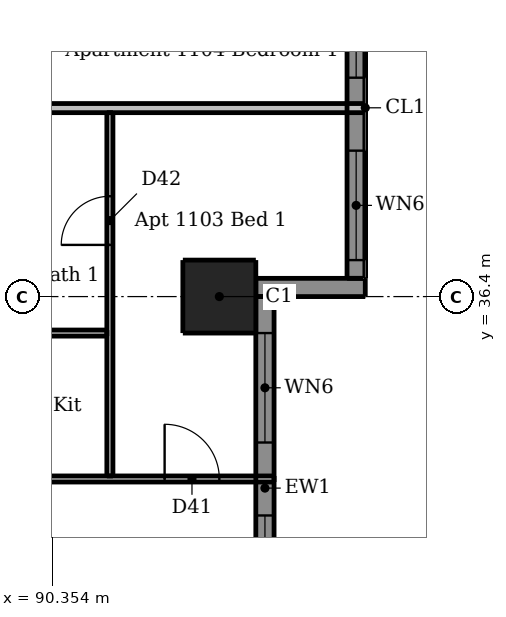
"""IFC4 building model, lengths in metres.
Left out: names, types, materials, properties, quantities, classifications, styles, units other than length and angle.
Written with IfcOpenShell. Run it as: python <this file> out.ifc"""

import sys

from ifc_helpers import new_model, si_unit, direction, frame, frame_2d, origin, origin_2d, place, context, subcontext, project, spatial, rectangle, extrude, element, fill, save


model = new_model("IFC4")
c1 = context("Model", 3, precision=1e-05, world=origin(), true_north=direction((0.0, 1.0)))
c2 = subcontext(c1, "Body", "Model", "MODEL_VIEW")
j1 = project(units=[si_unit("LENGTHUNIT", "METRE"), si_unit("PLANEANGLEUNIT", "RADIAN")], contexts=[c1])
p1 = place(None, origin())
s1 = spatial("IfcSite", under=j1, at=p1, CompositionType="ELEMENT")
p2 = place(p1, origin())
s2 = spatial("IfcBuilding", under=s1, at=p2, CompositionType="ELEMENT")
p3 = place(p2, frame((0.0, 0.0, 43.3)))
s3 = spatial("IfcBuildingStorey", under=s2, at=p3, CompositionType="ELEMENT", Elevation=43.3)
p4 = place(p3, frame((93.1, 36.4, 0.0), z_axis=(0.0, 0.0, 1.0), x_axis=(1.0, 0.0, 0.0)))
e1 = element("IfcColumn", 1, at=p4, inside=s3, PredefinedType="COLUMN", context=c2, shape_type="SweptSolid", body=[
    extrude(rectangle(XDim=1.2, YDim=1.2, at=origin_2d()), origin(), (0.0, 0.0, 1.0), 3.05),
])
p5 = place(p3, frame((93.7, 36.55, 0.0), z_axis=(0.0, 0.0, 1.0), x_axis=(1.0, 0.0, 0.0)))
e2 = element("IfcWall", 2, at=p5, inside=s3, PredefinedType="SOLIDWALL", context=c2, shape_type="SweptSolid", body=[
    extrude(rectangle(XDim=1.8, YDim=0.3, at=frame_2d((0.9, 0.0))), origin(), (0.0, 0.0, 1.0), 3.05),
])
p6 = place(p3, frame((93.85, 30.1, 0.0), z_axis=(0.0, 0.0, 1.0), x_axis=(0.0, 1.0, 0.0)))
e3 = element("IfcWall", 3, at=p6, inside=s3, PredefinedType="SOLIDWALL", context=c2, shape_type="SweptSolid", body=[
    extrude(rectangle(XDim=6.3, YDim=0.3, at=frame_2d((3.15, 0.0))), origin(), (0.0, 0.0, 1.0), 3.05),
])
p7 = place(p6, frame((0.9, 0.0, 0.15)))
e4 = element("IfcOpeningElement", 4, at=p7, cuts=e3, PredefinedType="OPENING", context=c2, shape_type="SweptSolid", body=[
    extrude(rectangle(XDim=1.8, YDim=2.1, at=frame_2d((0.9, 1.05))), frame((0.0, 0.16, 0.0), z_axis=(0.0, -1.0, 0.0), x_axis=(1.0, 0.0, 0.0)), (0.0, 0.0, 1.0), 0.32),
])
p8 = place(p6, frame((3.9, 0.0, 0.15)))
e5 = element("IfcOpeningElement", 5, at=p8, cuts=e3, PredefinedType="OPENING", context=c2, shape_type="SweptSolid", body=[
    extrude(rectangle(XDim=1.8, YDim=2.1, at=frame_2d((0.9, 1.05))), frame((0.0, 0.16, 0.0), z_axis=(0.0, -1.0, 0.0), x_axis=(1.0, 0.0, 0.0)), (0.0, 0.0, 1.0), 0.32),
])
p9 = place(p3, frame((95.35, 36.7, 0.0), z_axis=(0.0, 0.0, 1.0), x_axis=(0.0, 1.0, 0.0)))
e6 = element("IfcWall", 6, at=p9, inside=s3, PredefinedType="SOLIDWALL", context=c2, shape_type="SweptSolid", body=[
    extrude(rectangle(XDim=5.61, YDim=0.3, at=frame_2d((2.805, 0.0))), origin(), (0.0, 0.0, 1.0), 3.05),
])
p10 = place(p9, frame((0.3, 0.0, 0.15)))
e7 = element("IfcOpeningElement", 7, at=p10, cuts=e6, PredefinedType="OPENING", context=c2, shape_type="SweptSolid", body=[
    extrude(rectangle(XDim=1.8, YDim=2.1, at=frame_2d((0.9, 1.05))), frame((0.0, 0.16, 0.0), z_axis=(0.0, -1.0, 0.0), x_axis=(1.0, 0.0, 0.0)), (0.0, 0.0, 1.0), 0.32),
])
p11 = place(p9, frame((3.3, 0.0, 0.15)))
e8 = element("IfcOpeningElement", 8, at=p11, cuts=e6, PredefinedType="OPENING", context=c2, shape_type="SweptSolid", body=[
    extrude(rectangle(XDim=1.8, YDim=2.1, at=frame_2d((0.9, 1.05))), frame((0.0, 0.16, 0.0), z_axis=(0.0, -1.0, 0.0), x_axis=(1.0, 0.0, 0.0)), (0.0, 0.0, 1.0), 0.32),
])
p12 = place(p3, frame((91.3, 33.45, 0.0), z_axis=(0.0, 0.0, 1.0), x_axis=(0.0, 1.0, 0.0)))
e9 = element("IfcWall", 9, at=p12, inside=s3, PredefinedType="PARTITIONING", context=c2, shape_type="SweptSolid", body=[
    extrude(rectangle(XDim=5.975, YDim=0.1, at=frame_2d((2.988, 0.0))), origin(), (0.0, 0.0, 1.0), 3.05),
])
p13 = place(p12, frame((3.8, 0.0, 0.0)))
e10 = element("IfcOpeningElement", 10, at=p13, cuts=e9, PredefinedType="OPENING", context=c2, shape_type="SweptSolid", body=[
    extrude(rectangle(XDim=0.8, YDim=2.1, at=frame_2d((0.4, 1.05))), frame((0.0, 0.06, 0.0), z_axis=(0.0, -1.0, 0.0), x_axis=(1.0, 0.0, 0.0)), (0.0, 0.0, 1.0), 0.12),
])
p14 = place(p3, frame((88.375, 35.8, 0.0), z_axis=(0.0, 0.0, 1.0), x_axis=(1.0, 0.0, 0.0)))
e11 = element("IfcWall", 11, at=p14, inside=s3, PredefinedType="PARTITIONING", context=c2, shape_type="SweptSolid", body=[
    extrude(rectangle(XDim=2.875, YDim=0.1, at=frame_2d((1.438, 0.0))), origin(), (0.0, 0.0, 1.0), 3.05),
])
p15 = place(p3, frame((88.375, 33.4, 0.0), z_axis=(0.0, 0.0, 1.0), x_axis=(1.0, 0.0, 0.0)))
e12 = element("IfcWall", 12, at=p15, inside=s3, PredefinedType="PARTITIONING", context=c2, shape_type="SweptSolid", body=[
    extrude(rectangle(XDim=5.625, YDim=0.1, at=frame_2d((2.812, 0.0))), origin(), (0.0, 0.0, 1.0), 3.05),
])
p16 = place(p15, frame((0.975, 0.0, 0.0)))
e13 = element("IfcOpeningElement", 13, at=p16, cuts=e12, PredefinedType="OPENING", context=c2, shape_type="SweptSolid", body=[
    extrude(rectangle(XDim=0.9, YDim=2.1, at=frame_2d((0.45, 1.05))), frame((0.0, 0.06, 0.0), z_axis=(0.0, -1.0, 0.0), x_axis=(1.0, 0.0, 0.0)), (0.0, 0.0, 1.0), 0.12),
])
p17 = place(p15, frame((3.825, 0.0, 0.0)))
e14 = element("IfcOpeningElement", 14, at=p17, cuts=e12, PredefinedType="OPENING", context=c2, shape_type="SweptSolid", body=[
    extrude(rectangle(XDim=0.9, YDim=2.1, at=frame_2d((0.45, 1.05))), frame((0.0, 0.06, 0.0), z_axis=(0.0, -1.0, 0.0), x_axis=(1.0, 0.0, 0.0)), (0.0, 0.0, 1.0), 0.12),
])
p18 = place(p3, frame((88.375, 39.5, 0.0), z_axis=(0.0, 0.0, 1.0), x_axis=(1.0, 0.0, 0.0)))
e15 = element("IfcWall", 15, at=p18, inside=s3, PredefinedType="PARTITIONING", context=c2, shape_type="SweptSolid", body=[
    extrude(rectangle(XDim=7.125, YDim=0.15, at=frame_2d((3.562, 0.0))), origin(), (0.0, 0.0, 1.0), 3.05),
])
p19 = place(p7, origin())
e16 = element("IfcWindow", 16, at=p19, inside=s3, PartitioningType="DOUBLE_PANEL_VERTICAL", PredefinedType="WINDOW", context=c2, shape_type="SweptSolid", body=[
    extrude(rectangle(XDim=1.8, YDim=2.1, at=frame_2d((0.9, 1.05))), frame((0.0, 0.03, 0.0), z_axis=(0.0, -1.0, 0.0), x_axis=(1.0, 0.0, 0.0)), (0.0, 0.0, 1.0), 0.06),
])
fill(e4, e16)
p20 = place(p8, origin())
e17 = element("IfcWindow", 17, at=p20, inside=s3, PartitioningType="DOUBLE_PANEL_VERTICAL", PredefinedType="WINDOW", context=c2, shape_type="SweptSolid", body=[
    extrude(rectangle(XDim=1.8, YDim=2.1, at=frame_2d((0.9, 1.05))), frame((0.0, 0.03, 0.0), z_axis=(0.0, -1.0, 0.0), x_axis=(1.0, 0.0, 0.0)), (0.0, 0.0, 1.0), 0.06),
])
fill(e5, e17)
p21 = place(p10, origin())
e18 = element("IfcWindow", 18, at=p21, inside=s3, PartitioningType="DOUBLE_PANEL_VERTICAL", PredefinedType="WINDOW", context=c2, shape_type="SweptSolid", body=[
    extrude(rectangle(XDim=1.8, YDim=2.1, at=frame_2d((0.9, 1.05))), frame((0.0, 0.03, 0.0), z_axis=(0.0, -1.0, 0.0), x_axis=(1.0, 0.0, 0.0)), (0.0, 0.0, 1.0), 0.06),
])
fill(e7, e18)
p22 = place(p11, origin())
e19 = element("IfcWindow", 19, at=p22, inside=s3, PartitioningType="DOUBLE_PANEL_VERTICAL", PredefinedType="WINDOW", context=c2, shape_type="SweptSolid", body=[
    extrude(rectangle(XDim=1.8, YDim=2.1, at=frame_2d((0.9, 1.05))), frame((0.0, 0.03, 0.0), z_axis=(0.0, -1.0, 0.0), x_axis=(1.0, 0.0, 0.0)), (0.0, 0.0, 1.0), 0.06),
])
fill(e8, e19)
p23 = place(p17, origin())
e20 = element("IfcDoor", 20, at=p23, inside=s3, OperationType="SINGLE_SWING_LEFT", PredefinedType="DOOR", context=c2, shape_type="SweptSolid", body=[
    extrude(rectangle(XDim=0.9, YDim=2.1, at=frame_2d((0.45, 1.05))), frame((0.0, 0.025, 0.0), z_axis=(0.0, -1.0, 0.0), x_axis=(1.0, 0.0, 0.0)), (0.0, 0.0, 1.0), 0.05),
])
fill(e14, e20)
p24 = place(p13, origin())
e21 = element("IfcDoor", 21, at=p24, inside=s3, OperationType="SINGLE_SWING_LEFT", PredefinedType="DOOR", context=c2, shape_type="SweptSolid", body=[
    extrude(rectangle(XDim=0.8, YDim=2.1, at=frame_2d((0.4, 1.05))), frame((0.0, 0.025, 0.0), z_axis=(0.0, -1.0, 0.0), x_axis=(1.0, 0.0, 0.0)), (0.0, 0.0, 1.0), 0.05),
])
fill(e10, e21)
save(model, sys.argv[1])
